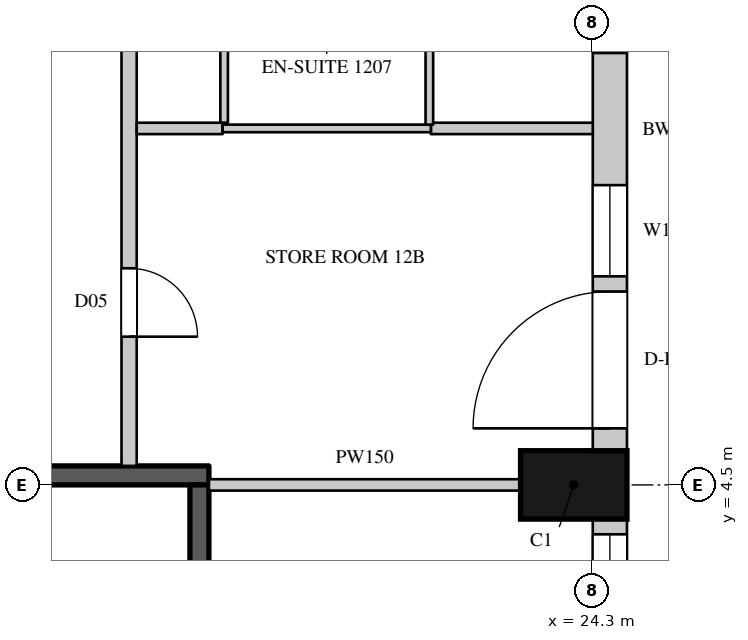
"""IFC4 building model, lengths in metres.
Left out: names, types, materials, properties, quantities, classifications, styles, units other than length and angle.
Written with IfcOpenShell. Run it as: python <this file> out.ifc"""

import sys

from ifc_helpers import new_model, si_unit, direction, frame, frame_2d, origin, origin_2d, place, context, subcontext, project, spatial, rectangle, extrude, element, fill, save


model = new_model("IFC4")
c1 = context("Model", 3, precision=1e-05, world=origin(), true_north=direction((0.0, 1.0)))
c2 = subcontext(c1, "Body", "Model", "MODEL_VIEW")
j1 = project(units=[si_unit("LENGTHUNIT", "METRE"), si_unit("PLANEANGLEUNIT", "RADIAN")], contexts=[c1])
p1 = place(None, origin())
s1 = spatial("IfcSite", under=j1, at=p1, CompositionType="ELEMENT")
p2 = place(p1, origin())
s2 = spatial("IfcBuilding", under=s1, at=p2, CompositionType="ELEMENT")
p3 = place(p2, frame((0.0, 0.0, 73.5)))
s3 = spatial("IfcBuildingStorey", under=s2, at=p3, CompositionType="ELEMENT", Elevation=73.5)
p4 = place(p3, frame((24.05, 4.5, 0.0), z_axis=(0.0, 0.0, 1.0), x_axis=(0.0, 1.0, 0.0)))
e1 = element("IfcColumn", 1, at=p4, inside=s3, PredefinedType="COLUMN", context=c2, shape_type="SweptSolid", body=[
    extrude(rectangle(XDim=0.9, YDim=1.4, at=origin_2d()), origin(), (0.0, 0.0, 1.0), 3.6),
])
p5 = place(p3, frame((24.525, -4.05, 0.0), z_axis=(0.0, 0.0, 1.0), x_axis=(0.0, 1.0, 0.0)))
e2 = element("IfcWall", 2, at=p5, inside=s3, PredefinedType="SOLIDWALL", context=c2, shape_type="SweptSolid", body=[
    extrude(rectangle(XDim=8.1, YDim=0.45, at=frame_2d((4.05, 0.0))), origin(), (0.0, 0.0, 1.0), 3.3),
])
p6 = place(p5, frame((0.2, 0.0, 0.0)))
e3 = element("IfcOpeningElement", 3, at=p6, cuts=e2, PredefinedType="OPENING", context=c2, shape_type="SweptSolid", body=[
    extrude(rectangle(XDim=1.8, YDim=2.4, at=frame_2d((0.9, 1.2))), frame((0.0, 0.235, 0.0), z_axis=(0.0, -1.0, 0.0), x_axis=(1.0, 0.0, 0.0)), (0.0, 0.0, 1.0), 0.47),
])
p7 = place(p5, frame((2.2, 0.0, 1.05)))
e4 = element("IfcOpeningElement", 4, at=p7, cuts=e2, PredefinedType="OPENING", context=c2, shape_type="SweptSolid", body=[
    extrude(rectangle(XDim=1.2, YDim=2.0, at=frame_2d((0.6, 1.0))), frame((0.0, 0.235, 0.0), z_axis=(0.0, -1.0, 0.0), x_axis=(1.0, 0.0, 0.0)), (0.0, 0.0, 1.0), 0.47),
])
p8 = place(p5, frame((4.7, 0.0, 0.0)))
e5 = element("IfcOpeningElement", 5, at=p8, cuts=e2, PredefinedType="OPENING", context=c2, shape_type="SweptSolid", body=[
    extrude(rectangle(XDim=1.8, YDim=2.4, at=frame_2d((0.9, 1.2))), frame((0.0, 0.235, 0.0), z_axis=(0.0, -1.0, 0.0), x_axis=(1.0, 0.0, 0.0)), (0.0, 0.0, 1.0), 0.47),
])
p9 = place(p5, frame((6.7, 0.0, 1.05)))
e6 = element("IfcOpeningElement", 6, at=p9, cuts=e2, PredefinedType="OPENING", context=c2, shape_type="SweptSolid", body=[
    extrude(rectangle(XDim=1.2, YDim=2.0, at=frame_2d((0.6, 1.0))), frame((0.0, 0.235, 0.0), z_axis=(0.0, -1.0, 0.0), x_axis=(1.0, 0.0, 0.0)), (0.0, 0.0, 1.0), 0.47),
])
p10 = place(p3, frame((24.525, 4.95, 0.0), z_axis=(0.0, 0.0, 1.0), x_axis=(0.0, 1.0, 0.0)))
e7 = element("IfcWall", 7, at=p10, inside=s3, PredefinedType="SOLIDWALL", context=c2, shape_type="SweptSolid", body=[
    extrude(rectangle(XDim=8.439, YDim=0.45, at=frame_2d((4.219, 0.0))), origin(), (0.0, 0.0, 1.0), 3.3),
])
p11 = place(p10, frame((0.294, 0.0, 0.0)))
e8 = element("IfcOpeningElement", 8, at=p11, cuts=e7, PredefinedType="OPENING", context=c2, shape_type="SweptSolid", body=[
    extrude(rectangle(XDim=1.8, YDim=2.4, at=frame_2d((0.9, 1.2))), frame((0.0, 0.235, 0.0), z_axis=(0.0, -1.0, 0.0), x_axis=(1.0, 0.0, 0.0)), (0.0, 0.0, 1.0), 0.47),
])
p12 = place(p10, frame((2.294, 0.0, 1.05)))
e9 = element("IfcOpeningElement", 9, at=p12, cuts=e7, PredefinedType="OPENING", context=c2, shape_type="SweptSolid", body=[
    extrude(rectangle(XDim=1.2, YDim=2.0, at=frame_2d((0.6, 1.0))), frame((0.0, 0.235, 0.0), z_axis=(0.0, -1.0, 0.0), x_axis=(1.0, 0.0, 0.0)), (0.0, 0.0, 1.0), 0.47),
])
p13 = place(p10, frame((5.232, 0.0, 1.05)))
e10 = element("IfcOpeningElement", 10, at=p13, cuts=e7, PredefinedType="OPENING", context=c2, shape_type="SweptSolid", body=[
    extrude(rectangle(XDim=2.7, YDim=2.0, at=frame_2d((1.35, 1.0))), frame((0.0, 0.235, 0.0), z_axis=(0.0, -1.0, 0.0), x_axis=(1.0, 0.0, 0.0)), (0.0, 0.0, 1.0), 0.47),
])
p14 = place(p3, frame((18.2, 4.75, 0.0), z_axis=(0.0, 0.0, 1.0), x_axis=(0.0, 1.0, 0.0)))
e11 = element("IfcWall", 11, at=p14, inside=s3, PredefinedType="PARTITIONING", context=c2, shape_type="SweptSolid", body=[
    extrude(rectangle(XDim=14.134, YDim=0.2, at=frame_2d((7.067, 0.0))), origin(), (0.0, 0.0, 1.0), 3.3),
])
p15 = place(p14, frame((1.7, 0.0, 0.0)))
e12 = element("IfcOpeningElement", 12, at=p15, cuts=e11, PredefinedType="OPENING", context=c2, shape_type="SweptSolid", body=[
    extrude(rectangle(XDim=0.9, YDim=2.2, at=frame_2d((0.45, 1.1))), frame((0.0, 0.11, 0.0), z_axis=(0.0, -1.0, 0.0), x_axis=(1.0, 0.0, 0.0)), (0.0, 0.0, 1.0), 0.22),
])
p16 = place(p3, frame((18.3, 9.19, 0.0), z_axis=(0.0, 0.0, 1.0), x_axis=(1.0, 0.0, 0.0)))
e13 = element("IfcWall", 13, at=p16, inside=s3, PredefinedType="PARTITIONING", context=c2, shape_type="SweptSolid", body=[
    extrude(rectangle(XDim=1.13, YDim=0.15, at=frame_2d((0.565, 0.0))), origin(), (0.0, 0.0, 1.0), 2.65),
])
p17 = place(p3, frame((19.25, 4.5, 0.0), z_axis=(0.0, 0.0, 1.0), x_axis=(1.0, 0.0, 0.0)))
e14 = element("IfcWall", 14, at=p17, inside=s3, PredefinedType="PARTITIONING", context=c2, shape_type="SweptSolid", body=[
    extrude(rectangle(XDim=4.1, YDim=0.15, at=frame_2d((2.05, 0.0))), origin(), (0.0, 0.0, 1.0), 3.3),
])
p18 = place(p3, frame((22.17, 9.19, 0.0), z_axis=(0.0, 0.0, 1.0), x_axis=(1.0, 0.0, 0.0)))
e15 = element("IfcWall", 15, at=p18, inside=s3, PredefinedType="PARTITIONING", context=c2, shape_type="SweptSolid", body=[
    extrude(rectangle(XDim=2.13, YDim=0.15, at=frame_2d((1.065, 0.0))), origin(), (0.0, 0.0, 1.0), 2.65),
])
p19 = place(p3, frame((14.55, 4.625, 0.0), z_axis=(0.0, 0.0, 1.0), x_axis=(1.0, 0.0, 0.0)))
e16 = element("IfcWall", 16, at=p19, inside=s3, PredefinedType="SHEAR", context=c2, shape_type="SweptSolid", body=[
    extrude(rectangle(XDim=4.7, YDim=0.25, at=frame_2d((2.35, 0.0))), origin(), (0.0, 0.0, 1.0), 3.3),
])
p20 = place(p3, frame((19.125, -4.5, 0.0), z_axis=(0.0, 0.0, 1.0), x_axis=(0.0, 1.0, 0.0)))
e17 = element("IfcWall", 17, at=p20, inside=s3, PredefinedType="SHEAR", context=c2, shape_type="SweptSolid", body=[
    extrude(rectangle(XDim=9.0, YDim=0.25, at=frame_2d((4.5, 0.0))), origin(), (0.0, 0.0, 1.0), 3.3),
])
p21 = place(p3, frame((19.43, 9.19, 0.0), z_axis=(0.0, 0.0, 1.0), x_axis=(1.0, 0.0, 0.0)))
e18 = element("IfcWall", 18, at=p21, inside=s3, PredefinedType="PARTITIONING", context=c2, shape_type="SweptSolid", body=[
    extrude(rectangle(XDim=2.74, YDim=0.1, at=frame_2d((1.37, 0.0))), origin(), (0.0, 0.0, 1.0), 2.65),
])
p22 = place(p3, frame((19.45, 9.265, 0.0), z_axis=(0.0, 0.0, 1.0), x_axis=(0.0, 1.0, 0.0)))
e19 = element("IfcWall", 19, at=p22, inside=s3, PredefinedType="PARTITIONING", context=c2, shape_type="SweptSolid", body=[
    extrude(rectangle(XDim=2.271, YDim=0.1, at=frame_2d((1.135, 0.0))), origin(), (0.0, 0.0, 1.0), 3.3),
])
p23 = place(p22, frame((1.2, 0.0, 0.0)))
e20 = element("IfcOpeningElement", 20, at=p23, cuts=e19, PredefinedType="OPENING", context=c2, shape_type="SweptSolid", body=[
    extrude(rectangle(XDim=0.9, YDim=2.2, at=frame_2d((0.45, 1.1))), frame((0.0, 0.06, 0.0), z_axis=(0.0, -1.0, 0.0), x_axis=(1.0, 0.0, 0.0)), (0.0, 0.0, 1.0), 0.12),
])
p24 = place(p3, frame((22.15, 9.24, 0.0), z_axis=(0.0, 0.0, 1.0), x_axis=(0.0, 1.0, 0.0)))
e21 = element("IfcWall", 21, at=p24, inside=s3, PredefinedType="PARTITIONING", context=c2, shape_type="SweptSolid", body=[
    extrude(rectangle(XDim=2.296, YDim=0.1, at=frame_2d((1.148, 0.0))), origin(), (0.0, 0.0, 1.0), 3.3),
])
p25 = place(p9, origin())
e22 = element("IfcWindow", 22, at=p25, inside=s3, PartitioningType="SINGLE_PANEL", PredefinedType="WINDOW", context=c2, shape_type="SweptSolid", body=[
    extrude(rectangle(XDim=1.2, YDim=2.0, at=frame_2d((0.6, 1.0))), frame((0.0, 0.135, 0.0), z_axis=(0.0, -1.0, 0.0), x_axis=(1.0, 0.0, 0.0)), (0.0, 0.0, 1.0), 0.06),
])
fill(e6, e22)
p26 = place(p11, origin())
e23 = element("IfcDoor", 23, at=p26, inside=s3, OperationType="SLIDING_TO_LEFT", PredefinedType="DOOR", context=c2, shape_type="SweptSolid", body=[
    extrude(rectangle(XDim=1.8, YDim=2.4, at=frame_2d((0.9, 1.2))), frame((0.0, 0.13, 0.0), z_axis=(0.0, -1.0, 0.0), x_axis=(1.0, 0.0, 0.0)), (0.0, 0.0, 1.0), 0.05),
])
fill(e8, e23)
p27 = place(p12, origin())
e24 = element("IfcWindow", 24, at=p27, inside=s3, PartitioningType="SINGLE_PANEL", PredefinedType="WINDOW", context=c2, shape_type="SweptSolid", body=[
    extrude(rectangle(XDim=1.2, YDim=2.0, at=frame_2d((0.6, 1.0))), frame((0.0, 0.135, 0.0), z_axis=(0.0, -1.0, 0.0), x_axis=(1.0, 0.0, 0.0)), (0.0, 0.0, 1.0), 0.06),
])
fill(e9, e24)
p28 = place(p13, origin())
e25 = element("IfcWindow", 25, at=p28, inside=s3, PartitioningType="SINGLE_PANEL", PredefinedType="WINDOW", context=c2, shape_type="SweptSolid", body=[
    extrude(rectangle(XDim=2.7, YDim=2.0, at=frame_2d((1.35, 1.0))), frame((0.0, 0.135, 0.0), z_axis=(0.0, -1.0, 0.0), x_axis=(1.0, 0.0, 0.0)), (0.0, 0.0, 1.0), 0.06),
])
fill(e10, e25)
p29 = place(p15, origin())
e26 = element("IfcDoor", 26, at=p29, inside=s3, OperationType="SINGLE_SWING_RIGHT", PredefinedType="DOOR", context=c2, shape_type="SweptSolid", body=[
    extrude(rectangle(XDim=0.9, YDim=2.2, at=frame_2d((0.45, 1.1))), frame((0.0, 0.025, 0.0), z_axis=(0.0, -1.0, 0.0), x_axis=(1.0, 0.0, 0.0)), (0.0, 0.0, 1.0), 0.05),
])
fill(e12, e26)
save(model, sys.argv[1])
